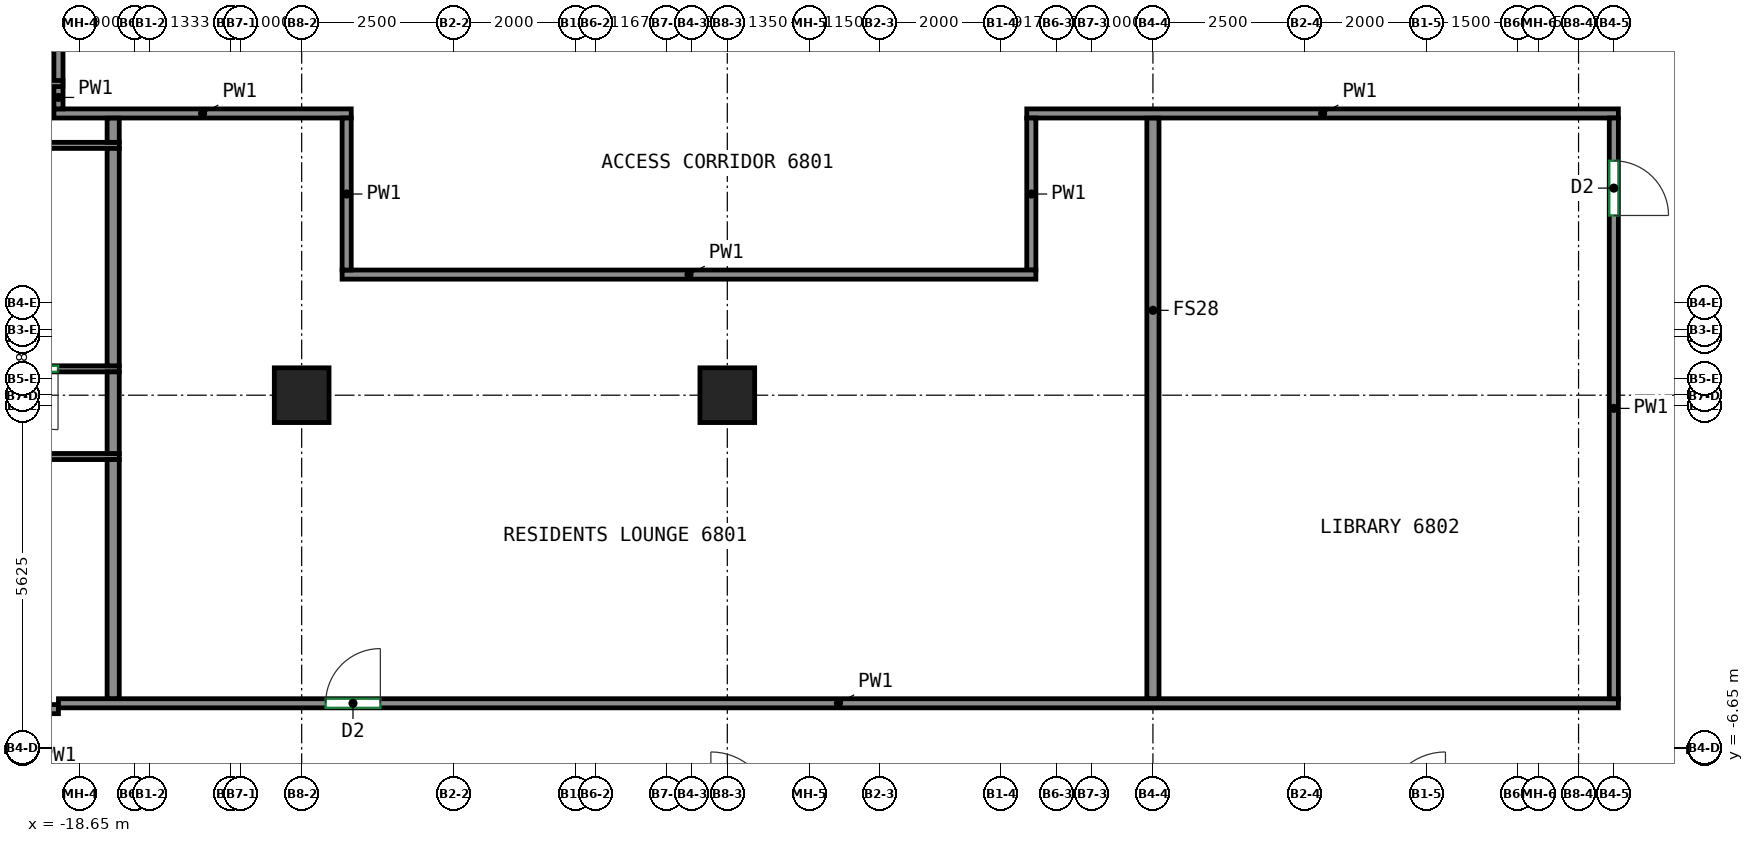
"""IFC4 building model, lengths in metres.
Left out: names, types, materials, properties, quantities, classifications, styles, units other than length and angle.
Written with IfcOpenShell. Run it as: python <this file> out.ifc"""

import sys

from ifc_helpers import new_model, si_unit, direction, frame, frame_2d, origin, origin_2d, place, context, subcontext, project, spatial, rectangle, extrude, source, transform, mapped, element, fill, save


model = new_model("IFC4")
c1 = context("Model", 3, precision=1e-05, world=origin(), true_north=direction((0.0, 1.0)))
c2 = subcontext(c1, "Body", "Model", "MODEL_VIEW")
j1 = project(units=[si_unit("LENGTHUNIT", "METRE"), si_unit("PLANEANGLEUNIT", "RADIAN")], contexts=[c1])
p1 = place(None, origin())
s1 = spatial("IfcSite", under=j1, at=p1, CompositionType="ELEMENT")
p2 = place(p1, origin())
s2 = spatial("IfcBuilding", under=s1, at=p2, CompositionType="ELEMENT")
p3 = place(p2, frame((0.0, 0.0, 277.2)))
s3 = spatial("IfcBuildingStorey", under=s2, at=p3, CompositionType="ELEMENT", Elevation=277.2)
m1 = source(origin(), c2, "Body", "SweptSolid", [
    extrude(rectangle(XDim=0.9, YDim=0.9, at=origin_2d()), origin(), (0.0, 0.0, 1.0), 3.12),
])
for number, where, z_axis, x_axis in (
    (1, (-15.0, -0.833, 0.0), (0.0, 0.0, 1.0), (1.0, 0.0, 0.0)),
    (2, (-8.0, -0.833, 0.0), (0.0, 0.0, 1.0), (1.0, 0.0, 0.0)),
):
    element("IfcColumn", number, at=place(p3, frame(where, z_axis=z_axis, x_axis=x_axis)), inside=s3, PredefinedType="COLUMN", context=c2, shape_type="MappedRepresentation", body=[
        mapped(m1, transform((0.0, 0.0, 0.0))),
    ])
p4 = place(p3, frame((-19.0, -5.996, 0.0), z_axis=(0.0, 0.0, 1.0), x_axis=(-1.0, 0.0, 0.0)))
e3 = element("IfcWall", 3, at=p4, inside=s3, PredefinedType="PARTITIONING", context=c2, shape_type="SweptSolid", body=[
    extrude(rectangle(XDim=0.677, YDim=0.15, at=frame_2d((0.338, 0.0))), origin(), (0.0, 0.0, 1.0), 3.12),
])
p5 = place(p3, frame((-19.0, -5.9, 0.0), z_axis=(0.0, 0.0, 1.0), x_axis=(1.0, 0.0, 0.0)))
e4 = element("IfcWall", 4, at=p5, inside=s3, PredefinedType="PARTITIONING", context=c2, shape_type="SweptSolid", body=[
    extrude(rectangle(XDim=25.655, YDim=0.15, at=frame_2d((12.828, 0.0))), origin(), (0.0, 0.0, 1.0), 3.12),
])
p6 = place(p5, frame((4.394, 0.0, 0.0)))
e5 = element("IfcOpeningElement", 5, at=p6, cuts=e4, PredefinedType="OPENING", context=c2, shape_type="SweptSolid", body=[
    extrude(rectangle(XDim=0.9, YDim=2.1, at=frame_2d((0.45, 1.05))), frame((0.0, 0.085, 0.0), z_axis=(0.0, -1.0, 0.0), x_axis=(1.0, 0.0, 0.0)), (0.0, 0.0, 1.0), 0.17),
])
p7 = place(p3, frame((-19.075, 3.8, 0.0), z_axis=(0.0, 0.0, 1.0), x_axis=(1.0, 0.0, 0.0)))
e6 = element("IfcWall", 6, at=p7, inside=s3, PredefinedType="PARTITIONING", context=c2, shape_type="SweptSolid", body=[
    extrude(rectangle(XDim=4.89, YDim=0.15, at=frame_2d((2.445, 0.0))), origin(), (0.0, 0.0, 1.0), 3.12),
])
p8 = place(p3, frame((-19.0, 3.875, 0.0), z_axis=(0.0, 0.0, 1.0), x_axis=(0.0, 1.0, 0.0)))
e7 = element("IfcWall", 7, at=p8, inside=s3, PredefinedType="PARTITIONING", context=c2, shape_type="SweptSolid", body=[
    extrude(rectangle(XDim=0.377, YDim=0.15, at=frame_2d((0.188, 0.0))), origin(), (0.0, 0.0, 1.0), 3.12),
])
p9 = place(p3, frame((-19.0, 4.332, 0.0), z_axis=(0.0, 0.0, 1.0), x_axis=(0.0, 1.0, 0.0)))
e8 = element("IfcWall", 8, at=p9, inside=s3, PredefinedType="PARTITIONING", context=c2, shape_type="SweptSolid", body=[
    extrude(rectangle(XDim=3.578, YDim=0.15, at=frame_2d((1.789, 0.0))), origin(), (0.0, 0.0, 1.0), 3.12),
])
p10 = place(p3, frame((-3.075, 3.8, 0.0), z_axis=(0.0, 0.0, 1.0), x_axis=(1.0, 0.0, 0.0)))
e9 = element("IfcWall", 9, at=p10, inside=s3, PredefinedType="PARTITIONING", context=c2, shape_type="SweptSolid", body=[
    extrude(rectangle(XDim=9.73, YDim=0.15, at=frame_2d((4.865, 0.0))), origin(), (0.0, 0.0, 1.0), 3.12),
])
p11 = place(p3, frame((-3.0, 1.225, 0.0), z_axis=(0.0, 0.0, 1.0), x_axis=(0.0, 1.0, 0.0)))
e10 = element("IfcWall", 10, at=p11, inside=s3, PredefinedType="PARTITIONING", context=c2, shape_type="SweptSolid", body=[
    extrude(rectangle(XDim=2.5, YDim=0.15, at=frame_2d((1.25, 0.0))), origin(), (0.0, 0.0, 1.0), 3.12),
])
p12 = place(p3, frame((-14.335, 1.15, 0.0), z_axis=(0.0, 0.0, 1.0), x_axis=(1.0, 0.0, 0.0)))
e11 = element("IfcWall", 11, at=p12, inside=s3, PredefinedType="PARTITIONING", context=c2, shape_type="SweptSolid", body=[
    extrude(rectangle(XDim=11.41, YDim=0.15, at=frame_2d((5.705, 0.0))), origin(), (0.0, 0.0, 1.0), 3.12),
])
p13 = place(p3, frame((-14.26, 3.725, 0.0), z_axis=(0.0, 0.0, 1.0), x_axis=(0.0, -1.0, 0.0)))
e12 = element("IfcWall", 12, at=p13, inside=s3, PredefinedType="PARTITIONING", context=c2, shape_type="SweptSolid", body=[
    extrude(rectangle(XDim=2.5, YDim=0.15, at=frame_2d((1.25, 0.0))), origin(), (0.0, 0.0, 1.0), 3.12),
])
p14 = place(p3, frame((6.58, 3.725, 0.0), z_axis=(0.0, 0.0, 1.0), x_axis=(0.0, -1.0, 0.0)))
e13 = element("IfcWall", 13, at=p14, inside=s3, PredefinedType="PARTITIONING", context=c2, shape_type="SweptSolid", body=[
    extrude(rectangle(XDim=9.55, YDim=0.15, at=frame_2d((4.775, 0.0))), origin(), (0.0, 0.0, 1.0), 3.12),
])
p15 = place(p14, frame((0.703, 0.0, 0.0)))
e14 = element("IfcOpeningElement", 14, at=p15, cuts=e13, PredefinedType="OPENING", context=c2, shape_type="SweptSolid", body=[
    extrude(rectangle(XDim=0.9, YDim=2.1, at=frame_2d((0.45, 1.05))), frame((0.0, 0.085, 0.0), z_axis=(0.0, -1.0, 0.0), x_axis=(1.0, 0.0, 0.0)), (0.0, 0.0, 1.0), 0.17),
])
p16 = place(p3, frame((-18.0, -1.842, 0.0), z_axis=(0.0, 0.0, 1.0), x_axis=(-1.0, 0.0, 0.0)))
e15 = element("IfcWall", 15, at=p16, inside=s3, PredefinedType="PARTITIONING", context=c2, shape_type="SweptSolid", body=[
    extrude(rectangle(XDim=7.25, YDim=0.1, at=frame_2d((3.625, 0.0))), origin(), (0.0, 0.0, 1.0), 3.12),
])
p17 = place(p16, frame((4.133, 0.0, 0.0)))
e16 = element("IfcOpeningElement", 16, at=p17, cuts=e15, PredefinedType="OPENING", context=c2, shape_type="SweptSolid", body=[
    extrude(rectangle(XDim=0.9, YDim=2.1, at=frame_2d((0.45, 1.05))), frame((0.0, 0.06, 0.0), z_axis=(0.0, -1.0, 0.0), x_axis=(1.0, 0.0, 0.0)), (0.0, 0.0, 1.0), 0.12),
])
p18 = place(p3, frame((-18.1, -5.823, 0.0), z_axis=(0.0, 0.0, 1.0), x_axis=(0.0, 1.0, 0.0)))
e17 = element("IfcWall", 17, at=p18, inside=s3, PredefinedType="PARTITIONING", context=c2, shape_type="SweptSolid", body=[
    extrude(rectangle(XDim=3.931, YDim=0.2, at=frame_2d((1.965, 0.0))), origin(), (0.0, 0.0, 1.0), 3.12),
])
p19 = place(p3, frame((-18.0, -0.4, 0.0), z_axis=(0.0, 0.0, 1.0), x_axis=(-1.0, 0.0, 0.0)))
e18 = element("IfcWall", 18, at=p19, inside=s3, PredefinedType="PARTITIONING", context=c2, shape_type="SweptSolid", body=[
    extrude(rectangle(XDim=7.25, YDim=0.1, at=frame_2d((3.625, 0.0))), origin(), (0.0, 0.0, 1.0), 3.12),
])
p20 = place(p19, frame((1.007, 0.0, 0.0)))
e19 = element("IfcOpeningElement", 19, at=p20, cuts=e18, PredefinedType="OPENING", context=c2, shape_type="SweptSolid", body=[
    extrude(rectangle(XDim=1.0, YDim=2.1, at=frame_2d((0.5, 1.05))), frame((0.0, 0.06, 0.0), z_axis=(0.0, -1.0, 0.0), x_axis=(1.0, 0.0, 0.0)), (0.0, 0.0, 1.0), 0.12),
])
p21 = place(p3, frame((-18.1, -1.792, 0.0), z_axis=(0.0, 0.0, 1.0), x_axis=(0.0, 1.0, 0.0)))
e20 = element("IfcWall", 20, at=p21, inside=s3, PredefinedType="PARTITIONING", context=c2, shape_type="SweptSolid", body=[
    extrude(rectangle(XDim=1.342, YDim=0.2, at=frame_2d((0.671, 0.0))), origin(), (0.0, 0.0, 1.0), 3.12),
])
p22 = place(p3, frame((-18.0, 3.275, 0.0), z_axis=(0.0, 0.0, 1.0), x_axis=(-1.0, 0.0, 0.0)))
e21 = element("IfcWall", 21, at=p22, inside=s3, PredefinedType="PARTITIONING", context=c2, shape_type="SweptSolid", body=[
    extrude(rectangle(XDim=7.25, YDim=0.1, at=frame_2d((3.625, 0.0))), origin(), (0.0, 0.0, 1.0), 3.12),
])
p23 = place(p22, frame((6.049, 0.0, 0.0)))
e22 = element("IfcOpeningElement", 22, at=p23, cuts=e21, PredefinedType="OPENING", context=c2, shape_type="SweptSolid", body=[
    extrude(rectangle(XDim=0.9, YDim=2.1, at=frame_2d((0.45, 1.05))), frame((0.0, 0.06, 0.0), z_axis=(0.0, -1.0, 0.0), x_axis=(1.0, 0.0, 0.0)), (0.0, 0.0, 1.0), 0.12),
])
p24 = place(p3, frame((-18.1, -0.35, 0.0), z_axis=(0.0, 0.0, 1.0), x_axis=(0.0, 1.0, 0.0)))
e23 = element("IfcWall", 23, at=p24, inside=s3, PredefinedType="PARTITIONING", context=c2, shape_type="SweptSolid", body=[
    extrude(rectangle(XDim=3.575, YDim=0.2, at=frame_2d((1.788, 0.0))), origin(), (0.0, 0.0, 1.0), 3.12),
])
p25 = place(p3, frame((-18.927, 4.292, 0.0), z_axis=(0.0, 0.0, 1.0), x_axis=(-1.0, 0.0, 0.0)))
e24 = element("IfcWall", 24, at=p25, inside=s3, PredefinedType="PARTITIONING", context=c2, shape_type="SweptSolid", body=[
    extrude(rectangle(XDim=6.323, YDim=0.1, at=frame_2d((3.162, 0.0))), origin(), (0.0, 0.0, 1.0), 3.12),
])
p26 = place(p25, frame((2.712, 0.0, 0.0)))
e25 = element("IfcOpeningElement", 25, at=p26, cuts=e24, PredefinedType="OPENING", context=c2, shape_type="SweptSolid", body=[
    extrude(rectangle(XDim=0.9, YDim=2.1, at=frame_2d((0.45, 1.05))), frame((0.0, 0.06, 0.0), z_axis=(0.0, -1.0, 0.0), x_axis=(1.0, 0.0, 0.0)), (0.0, 0.0, 1.0), 0.12),
])
p27 = place(p3, frame((-18.1, 3.325, 0.0), z_axis=(0.0, 0.0, 1.0), x_axis=(0.0, 1.0, 0.0)))
e26 = element("IfcWall", 26, at=p27, inside=s3, PredefinedType="PARTITIONING", context=c2, shape_type="SweptSolid", body=[
    extrude(rectangle(XDim=0.398, YDim=0.2, at=frame_2d((0.199, 0.0))), origin(), (0.0, 0.0, 1.0), 3.12),
])
p28 = place(p3, frame((-1.0, -5.823, 0.0), z_axis=(0.0, 0.0, 1.0), x_axis=(0.0, 1.0, 0.0)))
e27 = element("IfcWall", 27, at=p28, inside=s3, PredefinedType="PARTITIONING", context=c2, shape_type="SweptSolid", body=[
    extrude(rectangle(XDim=9.546, YDim=0.2, at=frame_2d((4.773, 0.0))), origin(), (0.0, 0.0, 1.0), 3.12),
])
p29 = place(p6, origin())
e28 = element("IfcDoor", 28, at=p29, inside=s3, OperationType="SINGLE_SWING_RIGHT", PredefinedType="DOOR", context=c2, shape_type="SweptSolid", body=[
    extrude(rectangle(XDim=0.9, YDim=2.1, at=frame_2d((0.45, 1.05))), frame((0.0, 0.025, 0.0), z_axis=(0.0, -1.0, 0.0), x_axis=(1.0, 0.0, 0.0)), (0.0, 0.0, 1.0), 0.05),
])
fill(e5, e28)
p30 = place(p20, origin())
e29 = element("IfcDoor", 29, at=p30, inside=s3, OperationType="SINGLE_SWING_LEFT", PredefinedType="DOOR", context=c2, shape_type="SweptSolid", body=[
    extrude(rectangle(XDim=1.0, YDim=2.1, at=frame_2d((0.5, 1.05))), frame((0.0, 0.025, 0.0), z_axis=(0.0, -1.0, 0.0), x_axis=(1.0, 0.0, 0.0)), (0.0, 0.0, 1.0), 0.05),
])
fill(e19, e29)
p31 = place(p15, origin())
e30 = element("IfcDoor", 30, at=p31, inside=s3, OperationType="SINGLE_SWING_RIGHT", PredefinedType="DOOR", context=c2, shape_type="SweptSolid", body=[
    extrude(rectangle(XDim=0.9, YDim=2.1, at=frame_2d((0.45, 1.05))), frame((0.0, 0.025, 0.0), z_axis=(0.0, -1.0, 0.0), x_axis=(1.0, 0.0, 0.0)), (0.0, 0.0, 1.0), 0.05),
])
fill(e14, e30)
save(model, sys.argv[1])
